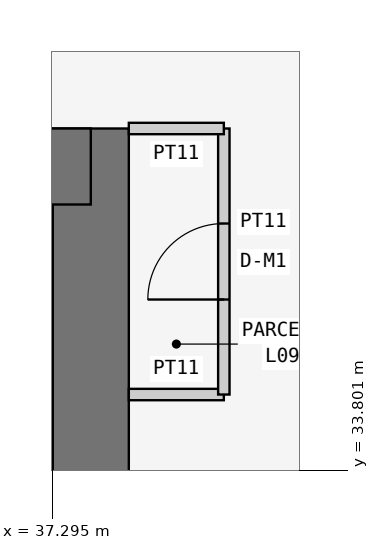
"""IFC4 building model, lengths in metres.
Left out: names, types, materials, properties, quantities, classifications, styles, units other than length and angle.
Written with IfcOpenShell. Run it as: python <this file> out.ifc"""

import sys

from ifc_helpers import new_model, si_unit, direction, frame, frame_2d, origin, place, context, subcontext, project, spatial, rectangle, extrude, element, fill, save


model = new_model("IFC4")
c1 = context("Model", 3, precision=1e-05, world=origin(), true_north=direction((0.0, 1.0)))
c2 = subcontext(c1, "Body", "Model", "MODEL_VIEW")
j1 = project(units=[si_unit("LENGTHUNIT", "METRE"), si_unit("PLANEANGLEUNIT", "RADIAN")], contexts=[c1])
p1 = place(None, origin())
s1 = spatial("IfcSite", under=j1, at=p1, CompositionType="ELEMENT")
p2 = place(p1, origin())
s2 = spatial("IfcBuilding", under=s1, at=p2, CompositionType="ELEMENT")
p3 = place(p2, frame((0.0, 0.0, 41.7)))
s3 = spatial("IfcBuildingStorey", under=s2, at=p3, CompositionType="ELEMENT", Elevation=41.7)
p4 = place(p3, frame((37.8, 21.0, 0.0), z_axis=(0.0, 0.0, 1.0), x_axis=(0.0, 1.0, 0.0)))
e1 = element("IfcWall", 1, at=p4, inside=s3, PredefinedType="SHEAR", context=c2, shape_type="SweptSolid", body=[
    extrude(rectangle(XDim=17.3, YDim=1.0, at=frame_2d((8.65, 0.0))), origin(), (0.0, 0.0, 1.0), 3.6),
])
p5 = place(p4, frame((5.2, 0.0, 0.0)))
e2 = element("IfcOpeningElement", 2, at=p5, cuts=e1, PredefinedType="OPENING", context=c2, shape_type="SweptSolid", body=[
    extrude(rectangle(XDim=1.2, YDim=2.1, at=frame_2d((0.6, 1.05))), frame((0.0, 0.51, 0.0), z_axis=(0.0, -1.0, 0.0), x_axis=(1.0, 0.0, 0.0)), (0.0, 0.0, 1.0), 1.02),
])
p6 = place(p3, frame((37.8, 37.8, 0.0), z_axis=(0.0, 0.0, 1.0), x_axis=(-1.0, 0.0, 0.0)))
e3 = element("IfcWall", 3, at=p6, inside=s3, PredefinedType="SHEAR", context=c2, shape_type="SweptSolid", body=[
    extrude(rectangle(XDim=17.3, YDim=1.0, at=frame_2d((8.65, 0.0))), origin(), (0.0, 0.0, 1.0), 3.6),
])
p7 = place(p3, frame((38.3, 34.8, 0.0), z_axis=(0.0, 0.0, 1.0), x_axis=(1.0, 0.0, 0.0)))
e4 = element("IfcWall", 4, at=p7, inside=s3, PredefinedType="PARTITIONING", context=c2, shape_type="SweptSolid", body=[
    extrude(rectangle(XDim=1.25, YDim=0.15, at=frame_2d((0.625, 0.0))), origin(), (0.0, 0.0, 1.0), 3.45),
])
p8 = place(p3, frame((39.55, 34.8, 0.0), z_axis=(0.0, 0.0, 1.0), x_axis=(0.0, 1.0, 0.0)))
e5 = element("IfcWall", 5, at=p8, inside=s3, PredefinedType="PARTITIONING", context=c2, shape_type="SweptSolid", body=[
    extrude(rectangle(XDim=3.5, YDim=0.15, at=frame_2d((1.75, 0.0))), origin(), (0.0, 0.0, 1.0), 3.45),
])
p9 = place(p8, frame((1.25, 0.0, 0.0)))
e6 = element("IfcOpeningElement", 6, at=p9, cuts=e5, PredefinedType="OPENING", context=c2, shape_type="SweptSolid", body=[
    extrude(rectangle(XDim=1.0, YDim=2.1, at=frame_2d((0.5, 1.05))), frame((0.0, 0.085, 0.0), z_axis=(0.0, -1.0, 0.0), x_axis=(1.0, 0.0, 0.0)), (0.0, 0.0, 1.0), 0.17),
])
p10 = place(p3, frame((39.55, 38.3, 0.0), z_axis=(0.0, 0.0, 1.0), x_axis=(-1.0, 0.0, 0.0)))
e7 = element("IfcWall", 7, at=p10, inside=s3, PredefinedType="PARTITIONING", context=c2, shape_type="SweptSolid", body=[
    extrude(rectangle(XDim=1.25, YDim=0.15, at=frame_2d((0.625, 0.0))), origin(), (0.0, 0.0, 1.0), 3.45),
])
p11 = place(p9, origin())
e8 = element("IfcDoor", 8, at=p11, inside=s3, OperationType="SINGLE_SWING_LEFT", PredefinedType="DOOR", context=c2, shape_type="SweptSolid", body=[
    extrude(rectangle(XDim=1.0, YDim=2.1, at=frame_2d((0.5, 1.05))), frame((0.0, 0.025, 0.0), z_axis=(0.0, -1.0, 0.0), x_axis=(1.0, 0.0, 0.0)), (0.0, 0.0, 1.0), 0.05),
])
fill(e6, e8)
save(model, sys.argv[1])
